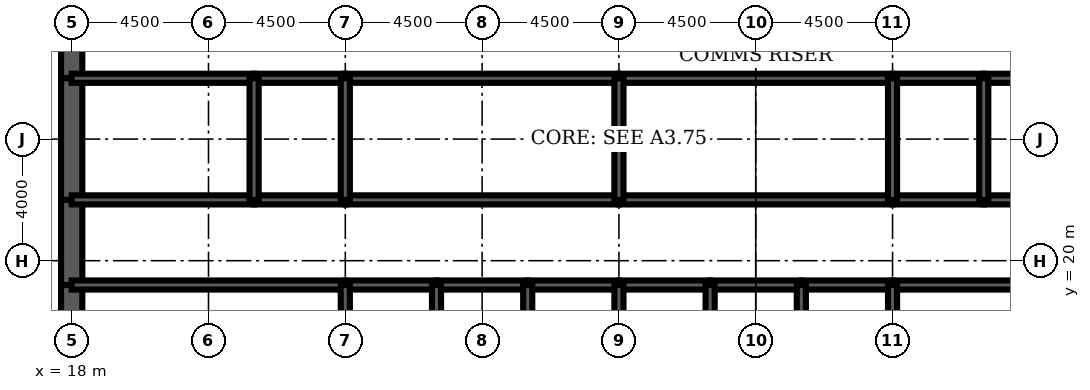
"""IFC4 building model, lengths in metres.
Left out: names, types, materials, properties, quantities, classifications, styles, units other than length and angle.
Written with IfcOpenShell. Run it as: python <this file> out.ifc"""

import sys

from ifc_helpers import new_model, si_unit, direction, frame, frame_2d, origin, place, context, subcontext, project, spatial, rectangle, extrude, element, fill, save


model = new_model("IFC4")
c1 = context("Model", 3, precision=1e-05, world=origin(), true_north=direction((0.0, 1.0)))
c2 = subcontext(c1, "Body", "Model", "MODEL_VIEW")
j1 = project(units=[si_unit("LENGTHUNIT", "METRE"), si_unit("PLANEANGLEUNIT", "RADIAN")], contexts=[c1])
p1 = place(None, origin())
s1 = spatial("IfcSite", under=j1, at=p1, CompositionType="ELEMENT")
p2 = place(p1, origin())
s2 = spatial("IfcBuilding", under=s1, at=p2, CompositionType="ELEMENT")
p3 = place(p2, frame((0.0, 0.0, 321.5)))
s3 = spatial("IfcBuildingStorey", under=s2, at=p3, CompositionType="ELEMENT", Elevation=321.5)
p4 = place(p3, frame((18.0, 28.8, 0.0), z_axis=(0.0, 0.0, 1.0), x_axis=(0.0, -1.0, 0.0)))
e1 = element("IfcWall", 1, at=p4, inside=s3, PredefinedType="SHEAR", context=c2, shape_type="SweptSolid", body=[
    extrude(rectangle(XDim=2.8, YDim=0.7, at=frame_2d((1.4, 0.0))), origin(), (0.0, 0.0, 1.0), 4.2),
])
p5 = place(p4, frame((0.4, 0.0, 0.0)))
e2 = element("IfcOpeningElement", 2, at=p5, cuts=e1, PredefinedType="OPENING", context=c2, shape_type="SweptSolid", body=[
    extrude(rectangle(XDim=1.8, YDim=2.1, at=frame_2d((0.9, 1.05))), frame((0.0, 0.36, 0.0), z_axis=(0.0, -1.0, 0.0), x_axis=(1.0, 0.0, 0.0)), (0.0, 0.0, 1.0), 0.72),
])
p6 = place(p3, frame((18.0, 26.0, 0.0), z_axis=(0.0, 0.0, 1.0), x_axis=(0.0, -1.0, 0.0)))
e3 = element("IfcWall", 3, at=p6, inside=s3, PredefinedType="SHEAR", context=c2, shape_type="SweptSolid", body=[
    extrude(rectangle(XDim=4.0, YDim=0.7, at=frame_2d((2.0, 0.0))), origin(), (0.0, 0.0, 1.0), 4.2),
])
p7 = place(p3, frame((18.0, 22.0, 0.0), z_axis=(0.0, 0.0, 1.0), x_axis=(0.0, -1.0, 0.0)))
e4 = element("IfcWall", 4, at=p7, inside=s3, PredefinedType="SHEAR", context=c2, shape_type="SweptSolid", body=[
    extrude(rectangle(XDim=2.8, YDim=0.7, at=frame_2d((1.4, 0.0))), origin(), (0.0, 0.0, 1.0), 4.2),
])
p8 = place(p7, frame((0.6, 0.0, 0.0)))
e5 = element("IfcOpeningElement", 5, at=p8, cuts=e4, PredefinedType="OPENING", context=c2, shape_type="SweptSolid", body=[
    extrude(rectangle(XDim=1.8, YDim=2.1, at=frame_2d((0.9, 1.05))), frame((0.0, 0.36, 0.0), z_axis=(0.0, -1.0, 0.0), x_axis=(1.0, 0.0, 0.0)), (0.0, 0.0, 1.0), 0.72),
])
p9 = place(p3, frame((18.0, 19.2, 0.0), z_axis=(0.0, 0.0, 1.0), x_axis=(0.0, -1.0, 0.0)))
e6 = element("IfcWall", 6, at=p9, inside=s3, PredefinedType="SHEAR", context=c2, shape_type="SweptSolid", body=[
    extrude(rectangle(XDim=3.2, YDim=0.7, at=frame_2d((1.6, 0.0))), origin(), (0.0, 0.0, 1.0), 4.2),
])
p10 = place(p3, frame((18.0, 19.2, 0.0), z_axis=(0.0, 0.0, 1.0), x_axis=(1.0, 0.0, 0.0)))
e7 = element("IfcWall", 7, at=p10, inside=s3, PredefinedType="SOLIDWALL", context=c2, shape_type="SweptSolid", body=[
    extrude(rectangle(XDim=9.0, YDim=0.3, at=frame_2d((4.5, 0.0))), origin(), (0.0, 0.0, 1.0), 4.2),
])
p11 = place(p10, frame((0.65, 0.0, 0.0)))
e8 = element("IfcOpeningElement", 8, at=p11, cuts=e7, PredefinedType="OPENING", context=c2, shape_type="SweptSolid", body=[
    extrude(rectangle(XDim=1.0, YDim=2.1, at=frame_2d((0.5, 1.05))), frame((0.0, 0.16, 0.0), z_axis=(0.0, -1.0, 0.0), x_axis=(1.0, 0.0, 0.0)), (0.0, 0.0, 1.0), 0.32),
])
p12 = place(p3, frame((27.0, 19.2, 0.0), z_axis=(0.0, 0.0, 1.0), x_axis=(1.0, 0.0, 0.0)))
e9 = element("IfcWall", 9, at=p12, inside=s3, PredefinedType="SOLIDWALL", context=c2, shape_type="SweptSolid", body=[
    extrude(rectangle(XDim=3.0, YDim=0.3, at=frame_2d((1.5, 0.0))), origin(), (0.0, 0.0, 1.0), 4.2),
])
p13 = place(p12, frame((0.95, 0.0, 0.0)))
e10 = element("IfcOpeningElement", 10, at=p13, cuts=e9, PredefinedType="OPENING", context=c2, shape_type="SweptSolid", body=[
    extrude(rectangle(XDim=1.1, YDim=2.2, at=frame_2d((0.55, 1.1))), frame((0.0, 0.16, 0.0), z_axis=(0.0, -1.0, 0.0), x_axis=(1.0, 0.0, 0.0)), (0.0, 0.0, 1.0), 0.32),
])
p14 = place(p3, frame((30.0, 19.2, 0.0), z_axis=(0.0, 0.0, 1.0), x_axis=(1.0, 0.0, 0.0)))
e11 = element("IfcWall", 11, at=p14, inside=s3, PredefinedType="SOLIDWALL", context=c2, shape_type="SweptSolid", body=[
    extrude(rectangle(XDim=3.0, YDim=0.3, at=frame_2d((1.5, 0.0))), origin(), (0.0, 0.0, 1.0), 4.2),
])
p15 = place(p14, frame((0.95, 0.0, 0.0)))
e12 = element("IfcOpeningElement", 12, at=p15, cuts=e11, PredefinedType="OPENING", context=c2, shape_type="SweptSolid", body=[
    extrude(rectangle(XDim=1.1, YDim=2.2, at=frame_2d((0.55, 1.1))), frame((0.0, 0.16, 0.0), z_axis=(0.0, -1.0, 0.0), x_axis=(1.0, 0.0, 0.0)), (0.0, 0.0, 1.0), 0.32),
])
p16 = place(p3, frame((33.0, 19.2, 0.0), z_axis=(0.0, 0.0, 1.0), x_axis=(1.0, 0.0, 0.0)))
e13 = element("IfcWall", 13, at=p16, inside=s3, PredefinedType="SOLIDWALL", context=c2, shape_type="SweptSolid", body=[
    extrude(rectangle(XDim=3.0, YDim=0.3, at=frame_2d((1.5, 0.0))), origin(), (0.0, 0.0, 1.0), 4.2),
])
p17 = place(p16, frame((0.95, 0.0, 0.0)))
e14 = element("IfcOpeningElement", 14, at=p17, cuts=e13, PredefinedType="OPENING", context=c2, shape_type="SweptSolid", body=[
    extrude(rectangle(XDim=1.1, YDim=2.2, at=frame_2d((0.55, 1.1))), frame((0.0, 0.16, 0.0), z_axis=(0.0, -1.0, 0.0), x_axis=(1.0, 0.0, 0.0)), (0.0, 0.0, 1.0), 0.32),
])
p18 = place(p3, frame((36.0, 19.2, 0.0), z_axis=(0.0, 0.0, 1.0), x_axis=(1.0, 0.0, 0.0)))
e15 = element("IfcWall", 15, at=p18, inside=s3, PredefinedType="SOLIDWALL", context=c2, shape_type="SweptSolid", body=[
    extrude(rectangle(XDim=3.0, YDim=0.3, at=frame_2d((1.5, 0.0))), origin(), (0.0, 0.0, 1.0), 4.2),
])
p19 = place(p18, frame((0.95, 0.0, 0.0)))
e16 = element("IfcOpeningElement", 16, at=p19, cuts=e15, PredefinedType="OPENING", context=c2, shape_type="SweptSolid", body=[
    extrude(rectangle(XDim=1.1, YDim=2.2, at=frame_2d((0.55, 1.1))), frame((0.0, 0.16, 0.0), z_axis=(0.0, -1.0, 0.0), x_axis=(1.0, 0.0, 0.0)), (0.0, 0.0, 1.0), 0.32),
])
p20 = place(p3, frame((39.0, 19.2, 0.0), z_axis=(0.0, 0.0, 1.0), x_axis=(1.0, 0.0, 0.0)))
e17 = element("IfcWall", 17, at=p20, inside=s3, PredefinedType="SOLIDWALL", context=c2, shape_type="SweptSolid", body=[
    extrude(rectangle(XDim=3.0, YDim=0.3, at=frame_2d((1.5, 0.0))), origin(), (0.0, 0.0, 1.0), 4.2),
])
p21 = place(p20, frame((1.0, 0.0, 0.0)))
e18 = element("IfcOpeningElement", 18, at=p21, cuts=e17, PredefinedType="OPENING", context=c2, shape_type="SweptSolid", body=[
    extrude(rectangle(XDim=1.0, YDim=2.1, at=frame_2d((0.5, 1.05))), frame((0.0, 0.16, 0.0), z_axis=(0.0, -1.0, 0.0), x_axis=(1.0, 0.0, 0.0)), (0.0, 0.0, 1.0), 0.32),
])
p22 = place(p3, frame((42.0, 19.2, 0.0), z_axis=(0.0, 0.0, 1.0), x_axis=(1.0, 0.0, 0.0)))
e19 = element("IfcWall", 19, at=p22, inside=s3, PredefinedType="SOLIDWALL", context=c2, shape_type="SweptSolid", body=[
    extrude(rectangle(XDim=3.0, YDim=0.3, at=frame_2d((1.5, 0.0))), origin(), (0.0, 0.0, 1.0), 4.2),
])
p23 = place(p22, frame((1.0, 0.0, 0.0)))
e20 = element("IfcOpeningElement", 20, at=p23, cuts=e19, PredefinedType="OPENING", context=c2, shape_type="SweptSolid", body=[
    extrude(rectangle(XDim=1.0, YDim=2.1, at=frame_2d((0.5, 1.05))), frame((0.0, 0.16, 0.0), z_axis=(0.0, -1.0, 0.0), x_axis=(1.0, 0.0, 0.0)), (0.0, 0.0, 1.0), 0.32),
])
p24 = place(p3, frame((45.0, 19.2, 0.0), z_axis=(0.0, 0.0, 1.0), x_axis=(1.0, 0.0, 0.0)))
e21 = element("IfcWall", 21, at=p24, inside=s3, PredefinedType="SOLIDWALL", context=c2, shape_type="SweptSolid", body=[
    extrude(rectangle(XDim=9.0, YDim=0.3, at=frame_2d((4.5, 0.0))), origin(), (0.0, 0.0, 1.0), 4.2),
])
p25 = place(p24, frame((7.35, 0.0, 0.0)))
e22 = element("IfcOpeningElement", 22, at=p25, cuts=e21, PredefinedType="OPENING", context=c2, shape_type="SweptSolid", body=[
    extrude(rectangle(XDim=1.0, YDim=2.1, at=frame_2d((0.5, 1.05))), frame((0.0, 0.16, 0.0), z_axis=(0.0, -1.0, 0.0), x_axis=(1.0, 0.0, 0.0)), (0.0, 0.0, 1.0), 0.32),
])
p26 = place(p3, frame((18.0, 22.0, 0.0), z_axis=(0.0, 0.0, 1.0), x_axis=(1.0, 0.0, 0.0)))
e23 = element("IfcWall", 23, at=p26, inside=s3, PredefinedType="SOLIDWALL", context=c2, shape_type="SweptSolid", body=[
    extrude(rectangle(XDim=6.0, YDim=0.3, at=frame_2d((3.0, 0.0))), origin(), (0.0, 0.0, 1.0), 4.2),
])
p27 = place(p26, frame((2.0, 0.0, 0.0)))
e24 = element("IfcOpeningElement", 24, at=p27, cuts=e23, PredefinedType="OPENING", context=c2, shape_type="SweptSolid", body=[
    extrude(rectangle(XDim=1.0, YDim=2.1, at=frame_2d((0.5, 1.05))), frame((0.0, 0.16, 0.0), z_axis=(0.0, -1.0, 0.0), x_axis=(1.0, 0.0, 0.0)), (0.0, 0.0, 1.0), 0.32),
])
p28 = place(p3, frame((24.0, 22.0, 0.0), z_axis=(0.0, 0.0, 1.0), x_axis=(1.0, 0.0, 0.0)))
e25 = element("IfcWall", 25, at=p28, inside=s3, PredefinedType="SOLIDWALL", context=c2, shape_type="SweptSolid", body=[
    extrude(rectangle(XDim=3.0, YDim=0.3, at=frame_2d((1.5, 0.0))), origin(), (0.0, 0.0, 1.0), 4.2),
])
p29 = place(p28, frame((1.0, 0.0, 0.0)))
e26 = element("IfcOpeningElement", 26, at=p29, cuts=e25, PredefinedType="OPENING", context=c2, shape_type="SweptSolid", body=[
    extrude(rectangle(XDim=1.0, YDim=2.1, at=frame_2d((0.5, 1.05))), frame((0.0, 0.16, 0.0), z_axis=(0.0, -1.0, 0.0), x_axis=(1.0, 0.0, 0.0)), (0.0, 0.0, 1.0), 0.32),
])
p30 = place(p3, frame((27.0, 22.0, 0.0), z_axis=(0.0, 0.0, 1.0), x_axis=(1.0, 0.0, 0.0)))
e27 = element("IfcWall", 27, at=p30, inside=s3, PredefinedType="SOLIDWALL", context=c2, shape_type="SweptSolid", body=[
    extrude(rectangle(XDim=9.0, YDim=0.3, at=frame_2d((4.5, 0.0))), origin(), (0.0, 0.0, 1.0), 4.2),
])
p31 = place(p30, frame((4.0, 0.0, 0.0)))
e28 = element("IfcOpeningElement", 28, at=p31, cuts=e27, PredefinedType="OPENING", context=c2, shape_type="SweptSolid", body=[
    extrude(rectangle(XDim=1.0, YDim=2.1, at=frame_2d((0.5, 1.05))), frame((0.0, 0.16, 0.0), z_axis=(0.0, -1.0, 0.0), x_axis=(1.0, 0.0, 0.0)), (0.0, 0.0, 1.0), 0.32),
])
p32 = place(p3, frame((36.0, 22.0, 0.0), z_axis=(0.0, 0.0, 1.0), x_axis=(1.0, 0.0, 0.0)))
e29 = element("IfcWall", 29, at=p32, inside=s3, PredefinedType="SOLIDWALL", context=c2, shape_type="SweptSolid", body=[
    extrude(rectangle(XDim=9.0, YDim=0.3, at=frame_2d((4.5, 0.0))), origin(), (0.0, 0.0, 1.0), 4.2),
])
p33 = place(p32, frame((4.0, 0.0, 0.0)))
e30 = element("IfcOpeningElement", 30, at=p33, cuts=e29, PredefinedType="OPENING", context=c2, shape_type="SweptSolid", body=[
    extrude(rectangle(XDim=1.0, YDim=2.1, at=frame_2d((0.5, 1.05))), frame((0.0, 0.16, 0.0), z_axis=(0.0, -1.0, 0.0), x_axis=(1.0, 0.0, 0.0)), (0.0, 0.0, 1.0), 0.32),
])
p34 = place(p3, frame((45.0, 22.0, 0.0), z_axis=(0.0, 0.0, 1.0), x_axis=(1.0, 0.0, 0.0)))
e31 = element("IfcWall", 31, at=p34, inside=s3, PredefinedType="SOLIDWALL", context=c2, shape_type="SweptSolid", body=[
    extrude(rectangle(XDim=3.0, YDim=0.3, at=frame_2d((1.5, 0.0))), origin(), (0.0, 0.0, 1.0), 4.2),
])
p35 = place(p34, frame((1.0, 0.0, 0.0)))
e32 = element("IfcOpeningElement", 32, at=p35, cuts=e31, PredefinedType="OPENING", context=c2, shape_type="SweptSolid", body=[
    extrude(rectangle(XDim=1.0, YDim=2.1, at=frame_2d((0.5, 1.05))), frame((0.0, 0.16, 0.0), z_axis=(0.0, -1.0, 0.0), x_axis=(1.0, 0.0, 0.0)), (0.0, 0.0, 1.0), 0.32),
])
p36 = place(p3, frame((48.0, 22.0, 0.0), z_axis=(0.0, 0.0, 1.0), x_axis=(1.0, 0.0, 0.0)))
e33 = element("IfcWall", 33, at=p36, inside=s3, PredefinedType="SOLIDWALL", context=c2, shape_type="SweptSolid", body=[
    extrude(rectangle(XDim=6.0, YDim=0.3, at=frame_2d((3.0, 0.0))), origin(), (0.0, 0.0, 1.0), 4.2),
])
p37 = place(p36, frame((2.0, 0.0, 0.0)))
e34 = element("IfcOpeningElement", 34, at=p37, cuts=e33, PredefinedType="OPENING", context=c2, shape_type="SweptSolid", body=[
    extrude(rectangle(XDim=1.0, YDim=2.1, at=frame_2d((0.5, 1.05))), frame((0.0, 0.16, 0.0), z_axis=(0.0, -1.0, 0.0), x_axis=(1.0, 0.0, 0.0)), (0.0, 0.0, 1.0), 0.32),
])
p38 = place(p36, frame((4.1, 0.0, 0.0)))
e35 = element("IfcOpeningElement", 35, at=p38, cuts=e33, PredefinedType="OPENING", context=c2, shape_type="SweptSolid", body=[
    extrude(rectangle(XDim=1.0, YDim=2.1, at=frame_2d((0.5, 1.05))), frame((0.0, 0.16, 0.0), z_axis=(0.0, -1.0, 0.0), x_axis=(1.0, 0.0, 0.0)), (0.0, 0.0, 1.0), 0.32),
])
p39 = place(p3, frame((18.0, 26.0, 0.0), z_axis=(0.0, 0.0, 1.0), x_axis=(1.0, 0.0, 0.0)))
e36 = element("IfcWall", 36, at=p39, inside=s3, PredefinedType="SOLIDWALL", context=c2, shape_type="SweptSolid", body=[
    extrude(rectangle(XDim=6.0, YDim=0.3, at=frame_2d((3.0, 0.0))), origin(), (0.0, 0.0, 1.0), 4.2),
])
p40 = place(p3, frame((24.0, 26.0, 0.0), z_axis=(0.0, 0.0, 1.0), x_axis=(1.0, 0.0, 0.0)))
e37 = element("IfcWall", 37, at=p40, inside=s3, PredefinedType="SOLIDWALL", context=c2, shape_type="SweptSolid", body=[
    extrude(rectangle(XDim=3.0, YDim=0.3, at=frame_2d((1.5, 0.0))), origin(), (0.0, 0.0, 1.0), 4.2),
])
for number, where, z_axis, x_axis in (
    (38, (27.0, 26.0, 0.0), (0.0, 0.0, 1.0), (1.0, 0.0, 0.0)),
    (39, (36.0, 26.0, 0.0), (0.0, 0.0, 1.0), (1.0, 0.0, 0.0)),
):
    element("IfcWall", number, at=place(p3, frame(where, z_axis=z_axis, x_axis=x_axis)), inside=s3, PredefinedType="SOLIDWALL", context=c2, shape_type="SweptSolid", body=[
        extrude(rectangle(XDim=9.0, YDim=0.3, at=frame_2d((4.5, 0.0))), origin(), (0.0, 0.0, 1.0), 4.2),
    ])
p41 = place(p3, frame((45.0, 26.0, 0.0), z_axis=(0.0, 0.0, 1.0), x_axis=(1.0, 0.0, 0.0)))
e40 = element("IfcWall", 40, at=p41, inside=s3, PredefinedType="SOLIDWALL", context=c2, shape_type="SweptSolid", body=[
    extrude(rectangle(XDim=3.0, YDim=0.3, at=frame_2d((1.5, 0.0))), origin(), (0.0, 0.0, 1.0), 4.2),
])
p42 = place(p3, frame((48.0, 26.0, 0.0), z_axis=(0.0, 0.0, 1.0), x_axis=(1.0, 0.0, 0.0)))
e41 = element("IfcWall", 41, at=p42, inside=s3, PredefinedType="SOLIDWALL", context=c2, shape_type="SweptSolid", body=[
    extrude(rectangle(XDim=6.0, YDim=0.3, at=frame_2d((3.0, 0.0))), origin(), (0.0, 0.0, 1.0), 4.2),
])
for number, where, z_axis, x_axis in (
    (42, (27.0, 16.0, 0.0), (0.0, 0.0, 1.0), (0.0, 1.0, 0.0)),
    (43, (30.0, 16.0, 0.0), (0.0, 0.0, 1.0), (0.0, 1.0, 0.0)),
    (44, (33.0, 16.0, 0.0), (0.0, 0.0, 1.0), (0.0, 1.0, 0.0)),
    (45, (36.0, 16.0, 0.0), (0.0, 0.0, 1.0), (0.0, 1.0, 0.0)),
    (46, (39.0, 16.0, 0.0), (0.0, 0.0, 1.0), (0.0, 1.0, 0.0)),
    (47, (42.0, 16.0, 0.0), (0.0, 0.0, 1.0), (0.0, 1.0, 0.0)),
    (48, (45.0, 16.0, 0.0), (0.0, 0.0, 1.0), (0.0, 1.0, 0.0)),
):
    element("IfcWall", number, at=place(p3, frame(where, z_axis=z_axis, x_axis=x_axis)), inside=s3, PredefinedType="SOLIDWALL", context=c2, shape_type="SweptSolid", body=[
        extrude(rectangle(XDim=3.2, YDim=0.3, at=frame_2d((1.6, 0.0))), origin(), (0.0, 0.0, 1.0), 4.2),
    ])
for number, where, z_axis, x_axis in (
    (49, (24.0, 22.0, 0.0), (0.0, 0.0, 1.0), (0.0, 1.0, 0.0)),
    (50, (27.0, 22.0, 0.0), (0.0, 0.0, 1.0), (0.0, 1.0, 0.0)),
    (51, (36.0, 22.0, 0.0), (0.0, 0.0, 1.0), (0.0, 1.0, 0.0)),
    (52, (45.0, 22.0, 0.0), (0.0, 0.0, 1.0), (0.0, 1.0, 0.0)),
    (53, (48.0, 22.0, 0.0), (0.0, 0.0, 1.0), (0.0, 1.0, 0.0)),
):
    element("IfcWall", number, at=place(p3, frame(where, z_axis=z_axis, x_axis=x_axis)), inside=s3, PredefinedType="SOLIDWALL", context=c2, shape_type="SweptSolid", body=[
        extrude(rectangle(XDim=4.0, YDim=0.3, at=frame_2d((2.0, 0.0))), origin(), (0.0, 0.0, 1.0), 4.2),
    ])
p43 = place(p3, frame((38.5, 22.15, 0.0), z_axis=(0.0, 0.0, 1.0), x_axis=(0.0, 1.0, 0.0)))
e54 = element("IfcWall", 54, at=p43, inside=s3, PredefinedType="PARTITIONING", context=c2, shape_type="SweptSolid", body=[
    extrude(rectangle(XDim=3.7, YDim=0.15, at=frame_2d((1.85, 0.0))), origin(), (0.0, 0.0, 1.0), 3.0),
])
p44 = place(p43, frame((2.2, 0.0, 0.0)))
e55 = element("IfcOpeningElement", 55, at=p44, cuts=e54, PredefinedType="OPENING", context=c2, shape_type="SweptSolid", body=[
    extrude(rectangle(XDim=1.0, YDim=2.1, at=frame_2d((0.5, 1.05))), frame((0.0, 0.085, 0.0), z_axis=(0.0, -1.0, 0.0), x_axis=(1.0, 0.0, 0.0)), (0.0, 0.0, 1.0), 0.17),
])
p45 = place(p3, frame((24.5, 19.35, 0.0), z_axis=(0.0, 0.0, 1.0), x_axis=(0.0, 1.0, 0.0)))
e56 = element("IfcWall", 56, at=p45, inside=s3, PredefinedType="PARTITIONING", context=c2, shape_type="SweptSolid", body=[
    extrude(rectangle(XDim=2.5, YDim=0.15, at=frame_2d((1.25, 0.0))), origin(), (0.0, 0.0, 1.0), 3.0),
])
p46 = place(p45, frame((1.15, 0.0, 0.0)))
e57 = element("IfcOpeningElement", 57, at=p46, cuts=e56, PredefinedType="OPENING", context=c2, shape_type="SweptSolid", body=[
    extrude(rectangle(XDim=1.0, YDim=2.1, at=frame_2d((0.5, 1.05))), frame((0.0, 0.085, 0.0), z_axis=(0.0, -1.0, 0.0), x_axis=(1.0, 0.0, 0.0)), (0.0, 0.0, 1.0), 0.17),
])
p47 = place(p44, origin())
e58 = element("IfcDoor", 58, at=p47, inside=s3, OperationType="SINGLE_SWING_RIGHT", PredefinedType="DOOR", context=c2, shape_type="SweptSolid", body=[
    extrude(rectangle(XDim=1.0, YDim=2.1, at=frame_2d((0.5, 1.05))), frame((0.0, 0.025, 0.0), z_axis=(0.0, -1.0, 0.0), x_axis=(1.0, 0.0, 0.0)), (0.0, 0.0, 1.0), 0.05),
])
fill(e55, e58)
p48 = place(p46, origin())
e59 = element("IfcDoor", 59, at=p48, inside=s3, OperationType="SINGLE_SWING_RIGHT", PredefinedType="DOOR", context=c2, shape_type="SweptSolid", body=[
    extrude(rectangle(XDim=1.0, YDim=2.1, at=frame_2d((0.5, 1.05))), frame((0.0, 0.025, 0.0), z_axis=(0.0, -1.0, 0.0), x_axis=(1.0, 0.0, 0.0)), (0.0, 0.0, 1.0), 0.05),
])
fill(e57, e59)
p49 = place(p13, origin())
e60 = element("IfcDoor", 60, at=p49, inside=s3, OperationType="DOUBLE_DOOR_SLIDING", PredefinedType="USERDEFINED", context=c2, shape_type="SweptSolid", body=[
    extrude(rectangle(XDim=1.1, YDim=2.2, at=frame_2d((0.55, 1.1))), frame((0.0, 0.025, 0.0), z_axis=(0.0, -1.0, 0.0), x_axis=(1.0, 0.0, 0.0)), (0.0, 0.0, 1.0), 0.05),
])
fill(e10, e60)
p50 = place(p15, origin())
e61 = element("IfcDoor", 61, at=p50, inside=s3, OperationType="DOUBLE_DOOR_SLIDING", PredefinedType="USERDEFINED", context=c2, shape_type="SweptSolid", body=[
    extrude(rectangle(XDim=1.1, YDim=2.2, at=frame_2d((0.55, 1.1))), frame((0.0, 0.025, 0.0), z_axis=(0.0, -1.0, 0.0), x_axis=(1.0, 0.0, 0.0)), (0.0, 0.0, 1.0), 0.05),
])
fill(e12, e61)
p51 = place(p17, origin())
e62 = element("IfcDoor", 62, at=p51, inside=s3, OperationType="DOUBLE_DOOR_SLIDING", PredefinedType="USERDEFINED", context=c2, shape_type="SweptSolid", body=[
    extrude(rectangle(XDim=1.1, YDim=2.2, at=frame_2d((0.55, 1.1))), frame((0.0, 0.025, 0.0), z_axis=(0.0, -1.0, 0.0), x_axis=(1.0, 0.0, 0.0)), (0.0, 0.0, 1.0), 0.05),
])
fill(e14, e62)
p52 = place(p19, origin())
e63 = element("IfcDoor", 63, at=p52, inside=s3, OperationType="DOUBLE_DOOR_SLIDING", PredefinedType="USERDEFINED", context=c2, shape_type="SweptSolid", body=[
    extrude(rectangle(XDim=1.1, YDim=2.2, at=frame_2d((0.55, 1.1))), frame((0.0, 0.025, 0.0), z_axis=(0.0, -1.0, 0.0), x_axis=(1.0, 0.0, 0.0)), (0.0, 0.0, 1.0), 0.05),
])
fill(e16, e63)
p53 = place(p11, origin())
e64 = element("IfcDoor", 64, at=p53, inside=s3, OperationType="SINGLE_SWING_LEFT", PredefinedType="DOOR", context=c2, shape_type="SweptSolid", body=[
    extrude(rectangle(XDim=1.0, YDim=2.1, at=frame_2d((0.5, 1.05))), frame((0.0, 0.025, 0.0), z_axis=(0.0, -1.0, 0.0), x_axis=(1.0, 0.0, 0.0)), (0.0, 0.0, 1.0), 0.05),
])
fill(e8, e64)
p54 = place(p8, origin())
e65 = element("IfcDoor", 65, at=p54, inside=s3, OperationType="SINGLE_SWING_LEFT", PredefinedType="DOOR", context=c2, shape_type="SweptSolid", body=[
    extrude(rectangle(XDim=1.8, YDim=2.1, at=frame_2d((0.9, 1.05))), frame((0.0, 0.35, 0.0), z_axis=(0.0, -1.0, 0.0), x_axis=(1.0, 0.0, 0.0)), (0.0, 0.0, 1.0), 0.699),
])
fill(e5, e65)
p55 = place(p5, origin())
e66 = element("IfcDoor", 66, at=p55, inside=s3, OperationType="SINGLE_SWING_LEFT", PredefinedType="DOOR", context=c2, shape_type="SweptSolid", body=[
    extrude(rectangle(XDim=1.8, YDim=2.1, at=frame_2d((0.9, 1.05))), frame((0.0, 0.35, 0.0), z_axis=(0.0, -1.0, 0.0), x_axis=(1.0, 0.0, 0.0)), (0.0, 0.0, 1.0), 0.699),
])
fill(e2, e66)
p56 = place(p27, origin())
e67 = element("IfcDoor", 67, at=p56, inside=s3, OperationType="SINGLE_SWING_LEFT", PredefinedType="DOOR", context=c2, shape_type="SweptSolid", body=[
    extrude(rectangle(XDim=1.0, YDim=2.1, at=frame_2d((0.5, 1.05))), frame((0.0, 0.025, 0.0), z_axis=(0.0, -1.0, 0.0), x_axis=(1.0, 0.0, 0.0)), (0.0, 0.0, 1.0), 0.05),
])
fill(e24, e67)
p57 = place(p29, origin())
e68 = element("IfcDoor", 68, at=p57, inside=s3, OperationType="SINGLE_SWING_LEFT", PredefinedType="DOOR", context=c2, shape_type="SweptSolid", body=[
    extrude(rectangle(XDim=1.0, YDim=2.1, at=frame_2d((0.5, 1.05))), frame((0.0, 0.025, 0.0), z_axis=(0.0, -1.0, 0.0), x_axis=(1.0, 0.0, 0.0)), (0.0, 0.0, 1.0), 0.05),
])
fill(e26, e68)
p58 = place(p31, origin())
e69 = element("IfcDoor", 69, at=p58, inside=s3, OperationType="SINGLE_SWING_LEFT", PredefinedType="DOOR", context=c2, shape_type="SweptSolid", body=[
    extrude(rectangle(XDim=1.0, YDim=2.1, at=frame_2d((0.5, 1.05))), frame((0.0, 0.025, 0.0), z_axis=(0.0, -1.0, 0.0), x_axis=(1.0, 0.0, 0.0)), (0.0, 0.0, 1.0), 0.05),
])
fill(e28, e69)
p59 = place(p33, origin())
e70 = element("IfcDoor", 70, at=p59, inside=s3, OperationType="SINGLE_SWING_LEFT", PredefinedType="DOOR", context=c2, shape_type="SweptSolid", body=[
    extrude(rectangle(XDim=1.0, YDim=2.1, at=frame_2d((0.5, 1.05))), frame((0.0, 0.025, 0.0), z_axis=(0.0, -1.0, 0.0), x_axis=(1.0, 0.0, 0.0)), (0.0, 0.0, 1.0), 0.05),
])
fill(e30, e70)
p60 = place(p35, origin())
e71 = element("IfcDoor", 71, at=p60, inside=s3, OperationType="SINGLE_SWING_LEFT", PredefinedType="DOOR", context=c2, shape_type="SweptSolid", body=[
    extrude(rectangle(XDim=1.0, YDim=2.1, at=frame_2d((0.5, 1.05))), frame((0.0, 0.025, 0.0), z_axis=(0.0, -1.0, 0.0), x_axis=(1.0, 0.0, 0.0)), (0.0, 0.0, 1.0), 0.05),
])
fill(e32, e71)
p61 = place(p21, origin())
e72 = element("IfcDoor", 72, at=p61, inside=s3, OperationType="SINGLE_SWING_LEFT", PredefinedType="DOOR", context=c2, shape_type="SweptSolid", body=[
    extrude(rectangle(XDim=1.0, YDim=2.1, at=frame_2d((0.5, 1.05))), frame((0.0, 0.025, 0.0), z_axis=(0.0, -1.0, 0.0), x_axis=(1.0, 0.0, 0.0)), (0.0, 0.0, 1.0), 0.05),
])
fill(e18, e72)
p62 = place(p23, origin())
e73 = element("IfcDoor", 73, at=p62, inside=s3, OperationType="SINGLE_SWING_LEFT", PredefinedType="DOOR", context=c2, shape_type="SweptSolid", body=[
    extrude(rectangle(XDim=1.0, YDim=2.1, at=frame_2d((0.5, 1.05))), frame((0.0, 0.025, 0.0), z_axis=(0.0, -1.0, 0.0), x_axis=(1.0, 0.0, 0.0)), (0.0, 0.0, 1.0), 0.05),
])
fill(e20, e73)
save(model, sys.argv[1])
